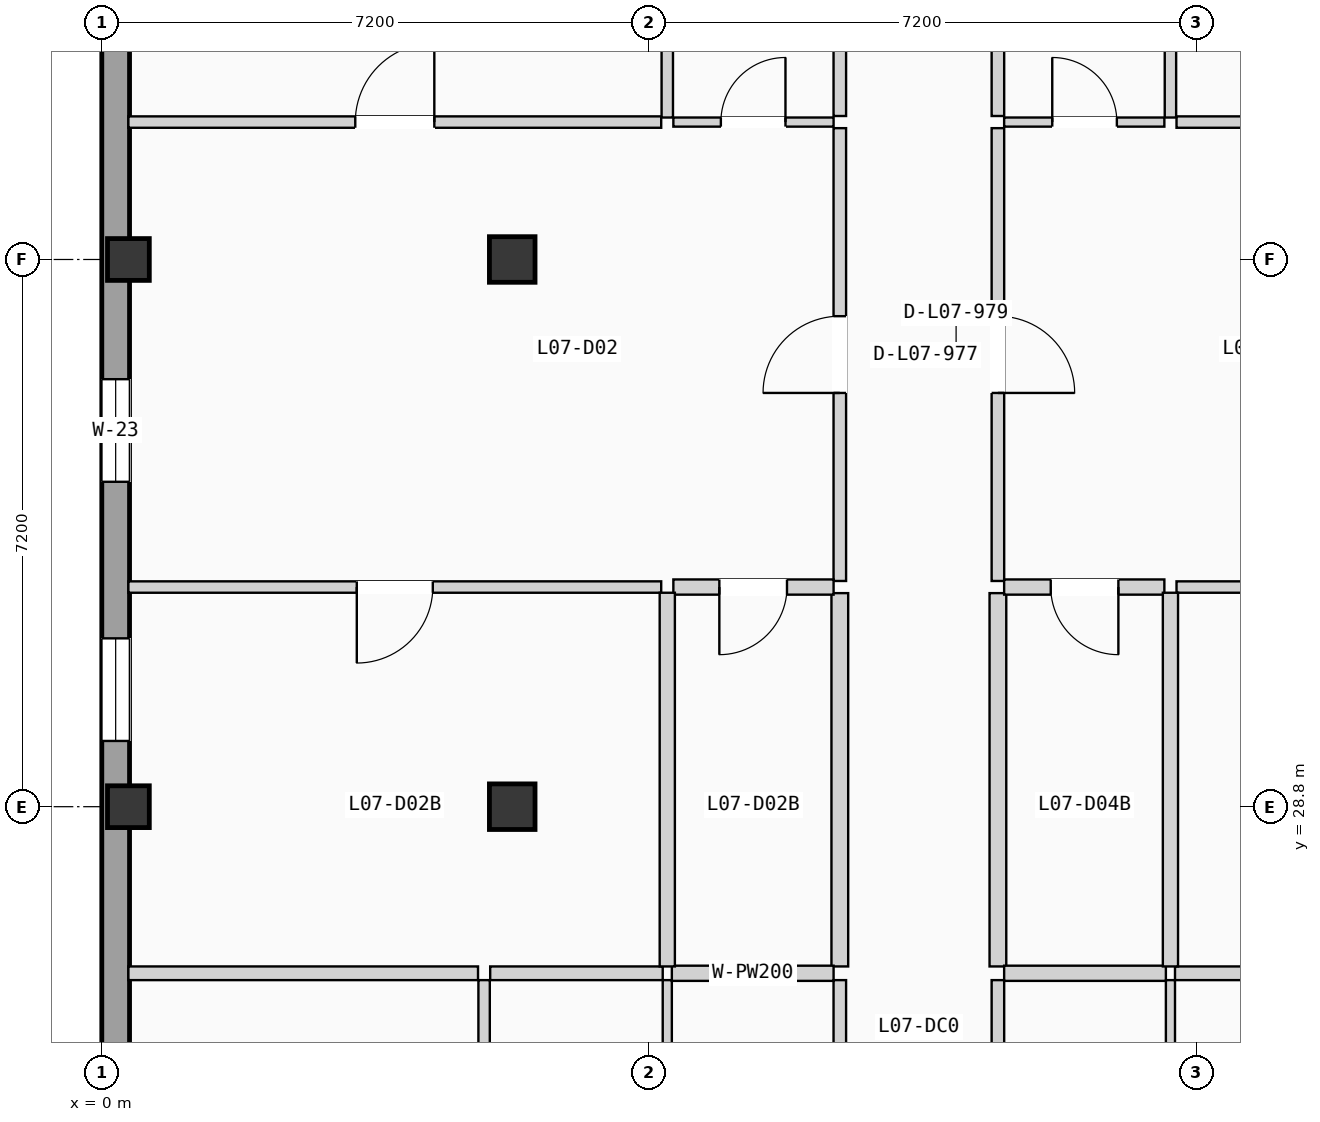
"""IFC4 building model, lengths in metres.
Left out: names, types, materials, properties, quantities, classifications, styles, units other than length and angle.
Written with IfcOpenShell. Run it as: python <this file> out.ifc"""

import sys

from ifc_helpers import new_model, si_unit, direction, frame, frame_2d, origin, origin_2d, place, context, subcontext, project, spatial, rectangle, extrude, element, fill, save


model = new_model("IFC4")
c1 = context("Model", 3, precision=1e-05, world=origin(), true_north=direction((0.0, 1.0)))
c2 = subcontext(c1, "Body", "Model", "MODEL_VIEW")
j1 = project(units=[si_unit("LENGTHUNIT", "METRE"), si_unit("PLANEANGLEUNIT", "RADIAN")], contexts=[c1])
p1 = place(None, origin())
s1 = spatial("IfcSite", under=j1, at=p1, CompositionType="ELEMENT")
p2 = place(p1, origin())
s2 = spatial("IfcBuilding", under=s1, at=p2, CompositionType="ELEMENT")
p3 = place(p2, frame((0.0, 0.0, 24.675)))
s3 = spatial("IfcBuildingStorey", under=s2, at=p3, CompositionType="ELEMENT", Elevation=24.675)
for number, where, z_axis, x_axis in (
    (1, (0.35, 28.8, 0.0), (0.0, 0.0, 1.0), (1.0, 0.0, 0.0)),
    (2, (0.35, 36.0, 0.0), (0.0, 0.0, 1.0), (1.0, 0.0, 0.0)),
):
    element("IfcColumn", number, at=place(p3, frame(where, z_axis=z_axis, x_axis=x_axis)), inside=s3, PredefinedType="COLUMN", context=c2, shape_type="SweptSolid", body=[
        extrude(rectangle(XDim=0.55, YDim=0.55, at=origin_2d()), origin(), (0.0, 0.0, 1.0), 3.15),
    ])
for number, where, z_axis, x_axis in (
    (3, (5.4, 28.8, 0.0), (0.0, 0.0, 1.0), (1.0, 0.0, 0.0)),
    (4, (5.4, 36.0, 0.0), (0.0, 0.0, 1.0), (1.0, 0.0, 0.0)),
):
    element("IfcColumn", number, at=place(p3, frame(where, z_axis=z_axis, x_axis=x_axis)), inside=s3, PredefinedType="COLUMN", context=c2, shape_type="SweptSolid", body=[
        extrude(rectangle(XDim=0.6, YDim=0.6, at=origin_2d()), origin(), (0.0, 0.0, 1.0), 3.15),
    ])
p4 = place(p3, frame((0.183, 0.365, 0.0), z_axis=(0.0, 0.0, 1.0), x_axis=(0.0, 1.0, 0.0)))
e5 = element("IfcWall", 5, at=p4, inside=s3, PredefinedType="SOLIDWALL", context=c2, shape_type="SweptSolid", body=[
    extrude(rectangle(XDim=49.67, YDim=0.365, at=frame_2d((24.835, 0.0))), origin(), (0.0, 0.0, 1.0), 2.6),
])
p5 = place(p4, frame((16.782, 0.0, 0.85)))
e6 = element("IfcOpeningElement", 6, at=p5, cuts=e5, PredefinedType="OPENING", context=c2, shape_type="SweptSolid", body=[
    extrude(rectangle(XDim=0.95, YDim=1.2, at=frame_2d((0.475, 0.6))), frame((0.0, 0.192, 0.0), z_axis=(0.0, -1.0, 0.0), x_axis=(1.0, 0.0, 0.0)), (0.0, 0.0, 1.0), 0.385),
])
p6 = place(p4, frame((9.452, 0.0, 0.9)))
e7 = element("IfcOpeningElement", 7, at=p6, cuts=e5, PredefinedType="OPENING", context=c2, shape_type="SweptSolid", body=[
    extrude(rectangle(XDim=1.35, YDim=1.2, at=frame_2d((0.675, 0.6))), frame((0.0, 0.192, 0.0), z_axis=(0.0, -1.0, 0.0), x_axis=(1.0, 0.0, 0.0)), (0.0, 0.0, 1.0), 0.385),
])
p7 = place(p4, frame((23.154, 0.0, 0.815)))
e8 = element("IfcOpeningElement", 8, at=p7, cuts=e5, PredefinedType="OPENING", context=c2, shape_type="SweptSolid", body=[
    extrude(rectangle(XDim=1.35, YDim=1.35, at=frame_2d((0.675, 0.675))), frame((0.0, 0.192, 0.0), z_axis=(0.0, -1.0, 0.0), x_axis=(1.0, 0.0, 0.0)), (0.0, 0.0, 1.0), 0.385),
])
p8 = place(p4, frame((32.71, 0.0, 0.665)))
e9 = element("IfcOpeningElement", 9, at=p8, cuts=e5, PredefinedType="OPENING", context=c2, shape_type="SweptSolid", body=[
    extrude(rectangle(XDim=1.35, YDim=1.5, at=frame_2d((0.675, 0.75))), frame((0.0, 0.192, 0.0), z_axis=(0.0, -1.0, 0.0), x_axis=(1.0, 0.0, 0.0)), (0.0, 0.0, 1.0), 0.385),
])
p9 = place(p4, frame((29.3, 0.0, 0.515)))
e10 = element("IfcOpeningElement", 10, at=p9, cuts=e5, PredefinedType="OPENING", context=c2, shape_type="SweptSolid", body=[
    extrude(rectangle(XDim=1.35, YDim=1.65, at=frame_2d((0.675, 0.825))), frame((0.0, 0.192, 0.0), z_axis=(0.0, -1.0, 0.0), x_axis=(1.0, 0.0, 0.0)), (0.0, 0.0, 1.0), 0.385),
])
p10 = place(p4, frame((39.504, 0.0, 0.85)))
e11 = element("IfcOpeningElement", 11, at=p10, cuts=e5, PredefinedType="OPENING", context=c2, shape_type="SweptSolid", body=[
    extrude(rectangle(XDim=0.95, YDim=1.2, at=frame_2d((0.475, 0.6))), frame((0.0, 0.192, 0.0), z_axis=(0.0, -1.0, 0.0), x_axis=(1.0, 0.0, 0.0)), (0.0, 0.0, 1.0), 0.385),
])
p11 = place(p3, frame((9.71, 20.733, 0.0), z_axis=(0.0, 0.0, 1.0), x_axis=(0.0, 1.0, 0.0)))
e12 = element("IfcWall", 12, at=p11, inside=s3, PredefinedType="PARTITIONING", context=c2, shape_type="SweptSolid", body=[
    extrude(rectangle(XDim=5.785, YDim=0.165, at=frame_2d((2.893, 0.0))), origin(), (0.0, 0.0, 1.0), 2.87),
])
p12 = place(p3, frame((9.71, 31.77, 0.0), z_axis=(0.0, 0.0, 1.0), x_axis=(0.0, 1.0, 0.0)))
e13 = element("IfcWall", 13, at=p12, inside=s3, PredefinedType="PARTITIONING", context=c2, shape_type="SweptSolid", body=[
    extrude(rectangle(XDim=5.958, YDim=0.165, at=frame_2d((2.979, 0.0))), origin(), (0.0, 0.0, 1.0), 2.87),
])
p13 = place(p12, frame((2.474, 0.0, 0.0)))
e14 = element("IfcOpeningElement", 14, at=p13, cuts=e13, PredefinedType="OPENING", context=c2, shape_type="SweptSolid", body=[
    extrude(rectangle(XDim=1.01, YDim=2.11, at=frame_2d((0.505, 1.055))), frame((0.0, 0.093, 0.0), z_axis=(0.0, -1.0, 0.0), x_axis=(1.0, 0.0, 0.0)), (0.0, 0.0, 1.0), 0.185),
])
p14 = place(p3, frame((9.71, 26.698, 0.0), z_axis=(0.0, 0.0, 1.0), x_axis=(0.0, 1.0, 0.0)))
e15 = element("IfcWall", 15, at=p14, inside=s3, PredefinedType="PLUMBINGWALL", context=c2, shape_type="SweptSolid", body=[
    extrude(rectangle(XDim=4.912, YDim=0.22, at=frame_2d((2.456, 0.0))), origin(), (0.0, 0.0, 1.0), 2.87),
])
p15 = place(p3, frame((9.71, 37.888, 0.0), z_axis=(0.0, 0.0, 1.0), x_axis=(0.0, 1.0, 0.0)))
e16 = element("IfcWall", 16, at=p15, inside=s3, PredefinedType="PARTITIONING", context=c2, shape_type="SweptSolid", body=[
    extrude(rectangle(XDim=4.912, YDim=0.165, at=frame_2d((2.456, 0.0))), origin(), (0.0, 0.0, 1.0), 2.87),
])
p16 = place(p3, frame((11.79, 20.733, 0.0), z_axis=(0.0, 0.0, 1.0), x_axis=(0.0, 1.0, 0.0)))
e17 = element("IfcWall", 17, at=p16, inside=s3, PredefinedType="PARTITIONING", context=c2, shape_type="SweptSolid", body=[
    extrude(rectangle(XDim=5.785, YDim=0.165, at=frame_2d((2.893, 0.0))), origin(), (0.0, 0.0, 1.0), 2.87),
])
p17 = place(p3, frame((11.79, 31.77, 0.0), z_axis=(0.0, 0.0, 1.0), x_axis=(0.0, 1.0, 0.0)))
e18 = element("IfcWall", 18, at=p17, inside=s3, PredefinedType="PARTITIONING", context=c2, shape_type="SweptSolid", body=[
    extrude(rectangle(XDim=5.958, YDim=0.165, at=frame_2d((2.979, 0.0))), origin(), (0.0, 0.0, 1.0), 2.87),
])
p18 = place(p17, frame((2.474, 0.0, 0.0)))
e19 = element("IfcOpeningElement", 19, at=p18, cuts=e18, PredefinedType="OPENING", context=c2, shape_type="SweptSolid", body=[
    extrude(rectangle(XDim=1.01, YDim=2.11, at=frame_2d((0.505, 1.055))), frame((0.0, 0.093, 0.0), z_axis=(0.0, -1.0, 0.0), x_axis=(1.0, 0.0, 0.0)), (0.0, 0.0, 1.0), 0.185),
])
p19 = place(p3, frame((11.79, 26.698, 0.0), z_axis=(0.0, 0.0, 1.0), x_axis=(0.0, 1.0, 0.0)))
e20 = element("IfcWall", 20, at=p19, inside=s3, PredefinedType="PLUMBINGWALL", context=c2, shape_type="SweptSolid", body=[
    extrude(rectangle(XDim=4.912, YDim=0.22, at=frame_2d((2.456, 0.0))), origin(), (0.0, 0.0, 1.0), 2.87),
])
p20 = place(p3, frame((11.79, 37.888, 0.0), z_axis=(0.0, 0.0, 1.0), x_axis=(0.0, 1.0, 0.0)))
e21 = element("IfcWall", 21, at=p20, inside=s3, PredefinedType="PARTITIONING", context=c2, shape_type="SweptSolid", body=[
    extrude(rectangle(XDim=4.912, YDim=0.165, at=frame_2d((2.456, 0.0))), origin(), (0.0, 0.0, 1.0), 2.87),
])
p21 = place(p3, frame((7.44, 20.713, 0.0), z_axis=(0.0, 0.0, 1.0), x_axis=(0.0, 1.0, 0.0)))
e22 = element("IfcWall", 22, at=p21, inside=s3, PredefinedType="PARTITIONING", context=c2, shape_type="SweptSolid", body=[
    extrude(rectangle(XDim=5.805, YDim=0.12, at=frame_2d((2.903, 0.0))), origin(), (0.0, 0.0, 1.0), 2.87),
])
p22 = place(p3, frame((7.5, 26.608, 0.0), z_axis=(0.0, 0.0, 1.0), x_axis=(1.0, 0.0, 0.0)))
e23 = element("IfcWall", 23, at=p22, inside=s3, PredefinedType="PLUMBINGWALL", context=c2, shape_type="SweptSolid", body=[
    extrude(rectangle(XDim=2.128, YDim=0.2, at=frame_2d((1.064, 0.0))), origin(), (0.0, 0.0, 1.0), 2.87),
])
p23 = place(p3, frame((5.03, 20.728, 0.0), z_axis=(0.0, 0.0, 1.0), x_axis=(0.0, 1.0, 0.0)))
e24 = element("IfcWall", 24, at=p23, inside=s3, PredefinedType="PARTITIONING", context=c2, shape_type="SweptSolid", body=[
    extrude(rectangle(XDim=5.79, YDim=0.15, at=frame_2d((2.895, 0.0))), origin(), (0.0, 0.0, 1.0), 2.87),
])
p24 = place(p3, frame((0.35, 26.608, 0.0), z_axis=(0.0, 0.0, 1.0), x_axis=(1.0, 0.0, 0.0)))
e25 = element("IfcWall", 25, at=p24, inside=s3, PredefinedType="PARTITIONING", context=c2, shape_type="SweptSolid", body=[
    extrude(rectangle(XDim=4.6, YDim=0.18, at=frame_2d((2.3, 0.0))), origin(), (0.0, 0.0, 1.0), 2.87),
])
p25 = place(p3, frame((5.11, 26.608, 0.0), z_axis=(0.0, 0.0, 1.0), x_axis=(1.0, 0.0, 0.0)))
e26 = element("IfcWall", 26, at=p25, inside=s3, PredefinedType="PARTITIONING", context=c2, shape_type="SweptSolid", body=[
    extrude(rectangle(XDim=2.27, YDim=0.18, at=frame_2d((1.135, 0.0))), origin(), (0.0, 0.0, 1.0), 2.87),
])
p26 = place(p3, frame((7.52, 31.69, 0.0), z_axis=(0.0, 0.0, 1.0), x_axis=(1.0, 0.0, 0.0)))
e27 = element("IfcWall", 27, at=p26, inside=s3, PredefinedType="PLUMBINGWALL", context=c2, shape_type="SweptSolid", body=[
    extrude(rectangle(XDim=2.108, YDim=0.2, at=frame_2d((1.054, 0.0))), origin(), (0.0, 0.0, 1.0), 2.87),
])
p27 = place(p26, frame((0.605, 0.0, 0.0)))
e28 = element("IfcOpeningElement", 28, at=p27, cuts=e27, PredefinedType="OPENING", context=c2, shape_type="SweptSolid", body=[
    extrude(rectangle(XDim=0.89, YDim=2.03, at=frame_2d((0.445, 1.015))), frame((0.0, 0.11, 0.0), z_axis=(0.0, -1.0, 0.0), x_axis=(1.0, 0.0, 0.0)), (0.0, 0.0, 1.0), 0.22),
])
p28 = place(p3, frame((7.52, 37.808, 0.0), z_axis=(0.0, 0.0, 1.0), x_axis=(1.0, 0.0, 0.0)))
e29 = element("IfcWall", 29, at=p28, inside=s3, PredefinedType="PARTITIONING", context=c2, shape_type="SweptSolid", body=[
    extrude(rectangle(XDim=2.108, YDim=0.12, at=frame_2d((1.054, 0.0))), origin(), (0.0, 0.0, 1.0), 2.87),
])
p29 = place(p28, frame((0.625, 0.0, 0.0)))
e30 = element("IfcOpeningElement", 30, at=p29, cuts=e29, PredefinedType="OPENING", context=c2, shape_type="SweptSolid", body=[
    extrude(rectangle(XDim=0.85, YDim=2.01, at=frame_2d((0.425, 1.005))), frame((0.0, 0.07, 0.0), z_axis=(0.0, -1.0, 0.0), x_axis=(1.0, 0.0, 0.0)), (0.0, 0.0, 1.0), 0.14),
])
p30 = place(p3, frame((0.35, 31.69, 0.0), z_axis=(0.0, 0.0, 1.0), x_axis=(1.0, 0.0, 0.0)))
e31 = element("IfcWall", 31, at=p30, inside=s3, PredefinedType="PARTITIONING", context=c2, shape_type="SweptSolid", body=[
    extrude(rectangle(XDim=7.01, YDim=0.15, at=frame_2d((3.505, 0.0))), origin(), (0.0, 0.0, 1.0), 2.87),
])
p31 = place(p30, frame((3.005, 0.0, 0.0)))
e32 = element("IfcOpeningElement", 32, at=p31, cuts=e31, PredefinedType="OPENING", context=c2, shape_type="SweptSolid", body=[
    extrude(rectangle(XDim=1.0, YDim=2.06, at=frame_2d((0.5, 1.03))), frame((0.0, 0.085, 0.0), z_axis=(0.0, -1.0, 0.0), x_axis=(1.0, 0.0, 0.0)), (0.0, 0.0, 1.0), 0.17),
])
p32 = place(p3, frame((0.35, 37.808, 0.0), z_axis=(0.0, 0.0, 1.0), x_axis=(1.0, 0.0, 0.0)))
e33 = element("IfcWall", 33, at=p32, inside=s3, PredefinedType="PARTITIONING", context=c2, shape_type="SweptSolid", body=[
    extrude(rectangle(XDim=7.01, YDim=0.15, at=frame_2d((3.505, 0.0))), origin(), (0.0, 0.0, 1.0), 2.87),
])
p33 = place(p32, frame((2.985, 0.0, 0.0)))
e34 = element("IfcOpeningElement", 34, at=p33, cuts=e33, PredefinedType="OPENING", context=c2, shape_type="SweptSolid", body=[
    extrude(rectangle(XDim=1.04, YDim=2.08, at=frame_2d((0.52, 1.04))), frame((0.0, 0.085, 0.0), z_axis=(0.0, -1.0, 0.0), x_axis=(1.0, 0.0, 0.0)), (0.0, 0.0, 1.0), 0.17),
])
p34 = place(p3, frame((7.44, 26.698, 0.0), z_axis=(0.0, 0.0, 1.0), x_axis=(0.0, 1.0, 0.0)))
e35 = element("IfcWall", 35, at=p34, inside=s3, PredefinedType="PLUMBINGWALL", context=c2, shape_type="SweptSolid", body=[
    extrude(rectangle(XDim=4.917, YDim=0.2, at=frame_2d((2.458, 0.0))), origin(), (0.0, 0.0, 1.0), 2.87),
])
p35 = place(p3, frame((7.44, 37.868, 0.0), z_axis=(0.0, 0.0, 1.0), x_axis=(0.0, 1.0, 0.0)))
e36 = element("IfcWall", 36, at=p35, inside=s3, PredefinedType="PARTITIONING", context=c2, shape_type="SweptSolid", body=[
    extrude(rectangle(XDim=4.932, YDim=0.15, at=frame_2d((2.466, 0.0))), origin(), (0.0, 0.0, 1.0), 2.87),
])
p36 = place(p3, frame((14.06, 20.713, 0.0), z_axis=(0.0, 0.0, 1.0), x_axis=(0.0, 1.0, 0.0)))
e37 = element("IfcWall", 37, at=p36, inside=s3, PredefinedType="PARTITIONING", context=c2, shape_type="SweptSolid", body=[
    extrude(rectangle(XDim=5.805, YDim=0.12, at=frame_2d((2.903, 0.0))), origin(), (0.0, 0.0, 1.0), 2.87),
])
p37 = place(p3, frame((11.872, 26.608, 0.0), z_axis=(0.0, 0.0, 1.0), x_axis=(1.0, 0.0, 0.0)))
e38 = element("IfcWall", 38, at=p37, inside=s3, PredefinedType="PLUMBINGWALL", context=c2, shape_type="SweptSolid", body=[
    extrude(rectangle(XDim=2.128, YDim=0.2, at=frame_2d((1.064, 0.0))), origin(), (0.0, 0.0, 1.0), 2.87),
])
p38 = place(p3, frame((14.12, 26.608, 0.0), z_axis=(0.0, 0.0, 1.0), x_axis=(1.0, 0.0, 0.0)))
e39 = element("IfcWall", 39, at=p38, inside=s3, PredefinedType="PARTITIONING", context=c2, shape_type="SweptSolid", body=[
    extrude(rectangle(XDim=2.27, YDim=0.18, at=frame_2d((1.135, 0.0))), origin(), (0.0, 0.0, 1.0), 2.87),
])
p39 = place(p3, frame((11.872, 31.69, 0.0), z_axis=(0.0, 0.0, 1.0), x_axis=(1.0, 0.0, 0.0)))
e40 = element("IfcWall", 40, at=p39, inside=s3, PredefinedType="PLUMBINGWALL", context=c2, shape_type="SweptSolid", body=[
    extrude(rectangle(XDim=2.108, YDim=0.2, at=frame_2d((1.054, 0.0))), origin(), (0.0, 0.0, 1.0), 2.87),
])
p40 = place(p39, frame((0.613, 0.0, 0.0)))
e41 = element("IfcOpeningElement", 41, at=p40, cuts=e40, PredefinedType="OPENING", context=c2, shape_type="SweptSolid", body=[
    extrude(rectangle(XDim=0.89, YDim=2.03, at=frame_2d((0.445, 1.015))), frame((0.0, 0.11, 0.0), z_axis=(0.0, -1.0, 0.0), x_axis=(1.0, 0.0, 0.0)), (0.0, 0.0, 1.0), 0.22),
])
p41 = place(p3, frame((11.872, 37.808, 0.0), z_axis=(0.0, 0.0, 1.0), x_axis=(1.0, 0.0, 0.0)))
e42 = element("IfcWall", 42, at=p41, inside=s3, PredefinedType="PARTITIONING", context=c2, shape_type="SweptSolid", body=[
    extrude(rectangle(XDim=2.108, YDim=0.12, at=frame_2d((1.054, 0.0))), origin(), (0.0, 0.0, 1.0), 2.87),
])
p42 = place(p41, frame((0.633, 0.0, 0.0)))
e43 = element("IfcOpeningElement", 43, at=p42, cuts=e42, PredefinedType="OPENING", context=c2, shape_type="SweptSolid", body=[
    extrude(rectangle(XDim=0.85, YDim=2.01, at=frame_2d((0.425, 1.005))), frame((0.0, 0.07, 0.0), z_axis=(0.0, -1.0, 0.0), x_axis=(1.0, 0.0, 0.0)), (0.0, 0.0, 1.0), 0.14),
])
p43 = place(p3, frame((14.14, 31.69, 0.0), z_axis=(0.0, 0.0, 1.0), x_axis=(1.0, 0.0, 0.0)))
e44 = element("IfcWall", 44, at=p43, inside=s3, PredefinedType="PARTITIONING", context=c2, shape_type="SweptSolid", body=[
    extrude(rectangle(XDim=7.11, YDim=0.15, at=frame_2d((3.555, 0.0))), origin(), (0.0, 0.0, 1.0), 2.87),
])
p44 = place(p43, frame((3.085, 0.0, 0.0)))
e45 = element("IfcOpeningElement", 45, at=p44, cuts=e44, PredefinedType="OPENING", context=c2, shape_type="SweptSolid", body=[
    extrude(rectangle(XDim=0.94, YDim=2.06, at=frame_2d((0.47, 1.03))), frame((0.0, 0.085, 0.0), z_axis=(0.0, -1.0, 0.0), x_axis=(1.0, 0.0, 0.0)), (0.0, 0.0, 1.0), 0.17),
])
p45 = place(p3, frame((14.14, 37.808, 0.0), z_axis=(0.0, 0.0, 1.0), x_axis=(1.0, 0.0, 0.0)))
e46 = element("IfcWall", 46, at=p45, inside=s3, PredefinedType="PARTITIONING", context=c2, shape_type="SweptSolid", body=[
    extrude(rectangle(XDim=7.11, YDim=0.15, at=frame_2d((3.555, 0.0))), origin(), (0.0, 0.0, 1.0), 2.87),
])
p46 = place(p45, frame((3.055, 0.0, 0.0)))
e47 = element("IfcOpeningElement", 47, at=p46, cuts=e46, PredefinedType="OPENING", context=c2, shape_type="SweptSolid", body=[
    extrude(rectangle(XDim=1.0, YDim=2.06, at=frame_2d((0.5, 1.03))), frame((0.0, 0.085, 0.0), z_axis=(0.0, -1.0, 0.0), x_axis=(1.0, 0.0, 0.0)), (0.0, 0.0, 1.0), 0.17),
])
p47 = place(p3, frame((14.06, 26.698, 0.0), z_axis=(0.0, 0.0, 1.0), x_axis=(0.0, 1.0, 0.0)))
e48 = element("IfcWall", 48, at=p47, inside=s3, PredefinedType="PLUMBINGWALL", context=c2, shape_type="SweptSolid", body=[
    extrude(rectangle(XDim=4.917, YDim=0.2, at=frame_2d((2.458, 0.0))), origin(), (0.0, 0.0, 1.0), 2.87),
])
p48 = place(p3, frame((14.06, 37.868, 0.0), z_axis=(0.0, 0.0, 1.0), x_axis=(0.0, 1.0, 0.0)))
e49 = element("IfcWall", 49, at=p48, inside=s3, PredefinedType="PARTITIONING", context=c2, shape_type="SweptSolid", body=[
    extrude(rectangle(XDim=4.932, YDim=0.15, at=frame_2d((2.466, 0.0))), origin(), (0.0, 0.0, 1.0), 2.87),
])
p49 = place(p8, origin())
e50 = element("IfcWindow", 50, at=p49, inside=s3, PartitioningType="SINGLE_PANEL", PredefinedType="WINDOW", context=c2, shape_type="SweptSolid", body=[
    extrude(rectangle(XDim=1.35, YDim=1.5, at=frame_2d((0.675, 0.75))), frame((0.0, 0.03, 0.0), z_axis=(0.0, -1.0, 0.0), x_axis=(1.0, 0.0, 0.0)), (0.0, 0.0, 1.0), 0.06),
])
fill(e9, e50)
p50 = place(p9, origin())
e51 = element("IfcWindow", 51, at=p50, inside=s3, PartitioningType="SINGLE_PANEL", PredefinedType="WINDOW", context=c2, shape_type="SweptSolid", body=[
    extrude(rectangle(XDim=1.35, YDim=1.65, at=frame_2d((0.675, 0.825))), frame((0.0, 0.03, 0.0), z_axis=(0.0, -1.0, 0.0), x_axis=(1.0, 0.0, 0.0)), (0.0, 0.0, 1.0), 0.06),
])
fill(e10, e51)
p51 = place(p13, origin())
e52 = element("IfcDoor", 52, at=p51, inside=s3, OperationType="SINGLE_SWING_LEFT", PredefinedType="DOOR", context=c2, shape_type="SweptSolid", body=[
    extrude(rectangle(XDim=1.01, YDim=2.11, at=frame_2d((0.505, 1.055))), frame((0.0, 0.025, 0.0), z_axis=(0.0, -1.0, 0.0), x_axis=(1.0, 0.0, 0.0)), (0.0, 0.0, 1.0), 0.05),
])
fill(e14, e52)
p52 = place(p18, frame((1.01, 0.0, 0.0), z_axis=(0.0, 0.0, 1.0), x_axis=(-1.0, 0.0, 0.0)))
e53 = element("IfcDoor", 53, at=p52, inside=s3, OperationType="SINGLE_SWING_LEFT", PredefinedType="DOOR", context=c2, shape_type="SweptSolid", body=[
    extrude(rectangle(XDim=1.01, YDim=2.11, at=frame_2d((0.505, 1.055))), frame((0.0, 0.025, 0.0), z_axis=(0.0, -1.0, 0.0), x_axis=(1.0, 0.0, 0.0)), (0.0, 0.0, 1.0), 0.05),
])
fill(e19, e53)
p53 = place(p27, frame((0.89, 0.0, 0.0), z_axis=(0.0, 0.0, 1.0), x_axis=(-1.0, 0.0, 0.0)))
e54 = element("IfcDoor", 54, at=p53, inside=s3, OperationType="SINGLE_SWING_LEFT", PredefinedType="DOOR", context=c2, shape_type="SweptSolid", body=[
    extrude(rectangle(XDim=0.89, YDim=2.03, at=frame_2d((0.445, 1.015))), frame((0.0, 0.025, 0.0), z_axis=(0.0, -1.0, 0.0), x_axis=(1.0, 0.0, 0.0)), (0.0, 0.0, 1.0), 0.05),
])
fill(e28, e54)
p54 = place(p29, origin())
e55 = element("IfcDoor", 55, at=p54, inside=s3, OperationType="SINGLE_SWING_RIGHT", PredefinedType="DOOR", context=c2, shape_type="SweptSolid", body=[
    extrude(rectangle(XDim=0.85, YDim=2.01, at=frame_2d((0.425, 1.005))), frame((0.0, 0.025, 0.0), z_axis=(0.0, -1.0, 0.0), x_axis=(1.0, 0.0, 0.0)), (0.0, 0.0, 1.0), 0.05),
])
fill(e30, e55)
p55 = place(p31, frame((1.0, 0.0, 0.0), z_axis=(0.0, 0.0, 1.0), x_axis=(-1.0, 0.0, 0.0)))
e56 = element("IfcDoor", 56, at=p55, inside=s3, OperationType="SINGLE_SWING_LEFT", PredefinedType="DOOR", context=c2, shape_type="SweptSolid", body=[
    extrude(rectangle(XDim=1.0, YDim=2.06, at=frame_2d((0.5, 1.03))), frame((0.0, 0.025, 0.0), z_axis=(0.0, -1.0, 0.0), x_axis=(1.0, 0.0, 0.0)), (0.0, 0.0, 1.0), 0.05),
])
fill(e32, e56)
p56 = place(p33, origin())
e57 = element("IfcDoor", 57, at=p56, inside=s3, OperationType="SINGLE_SWING_RIGHT", PredefinedType="DOOR", context=c2, shape_type="SweptSolid", body=[
    extrude(rectangle(XDim=1.04, YDim=2.08, at=frame_2d((0.52, 1.04))), frame((0.0, 0.025, 0.0), z_axis=(0.0, -1.0, 0.0), x_axis=(1.0, 0.0, 0.0)), (0.0, 0.0, 1.0), 0.05),
])
fill(e34, e57)
p57 = place(p40, frame((0.89, 0.0, 0.0), z_axis=(0.0, 0.0, 1.0), x_axis=(-1.0, 0.0, 0.0)))
e58 = element("IfcDoor", 58, at=p57, inside=s3, OperationType="SINGLE_SWING_RIGHT", PredefinedType="DOOR", context=c2, shape_type="SweptSolid", body=[
    extrude(rectangle(XDim=0.89, YDim=2.03, at=frame_2d((0.445, 1.015))), frame((0.0, 0.025, 0.0), z_axis=(0.0, -1.0, 0.0), x_axis=(1.0, 0.0, 0.0)), (0.0, 0.0, 1.0), 0.05),
])
fill(e41, e58)
p58 = place(p42, origin())
e59 = element("IfcDoor", 59, at=p58, inside=s3, OperationType="SINGLE_SWING_LEFT", PredefinedType="DOOR", context=c2, shape_type="SweptSolid", body=[
    extrude(rectangle(XDim=0.85, YDim=2.01, at=frame_2d((0.425, 1.005))), frame((0.0, 0.025, 0.0), z_axis=(0.0, -1.0, 0.0), x_axis=(1.0, 0.0, 0.0)), (0.0, 0.0, 1.0), 0.05),
])
fill(e43, e59)
save(model, sys.argv[1])
